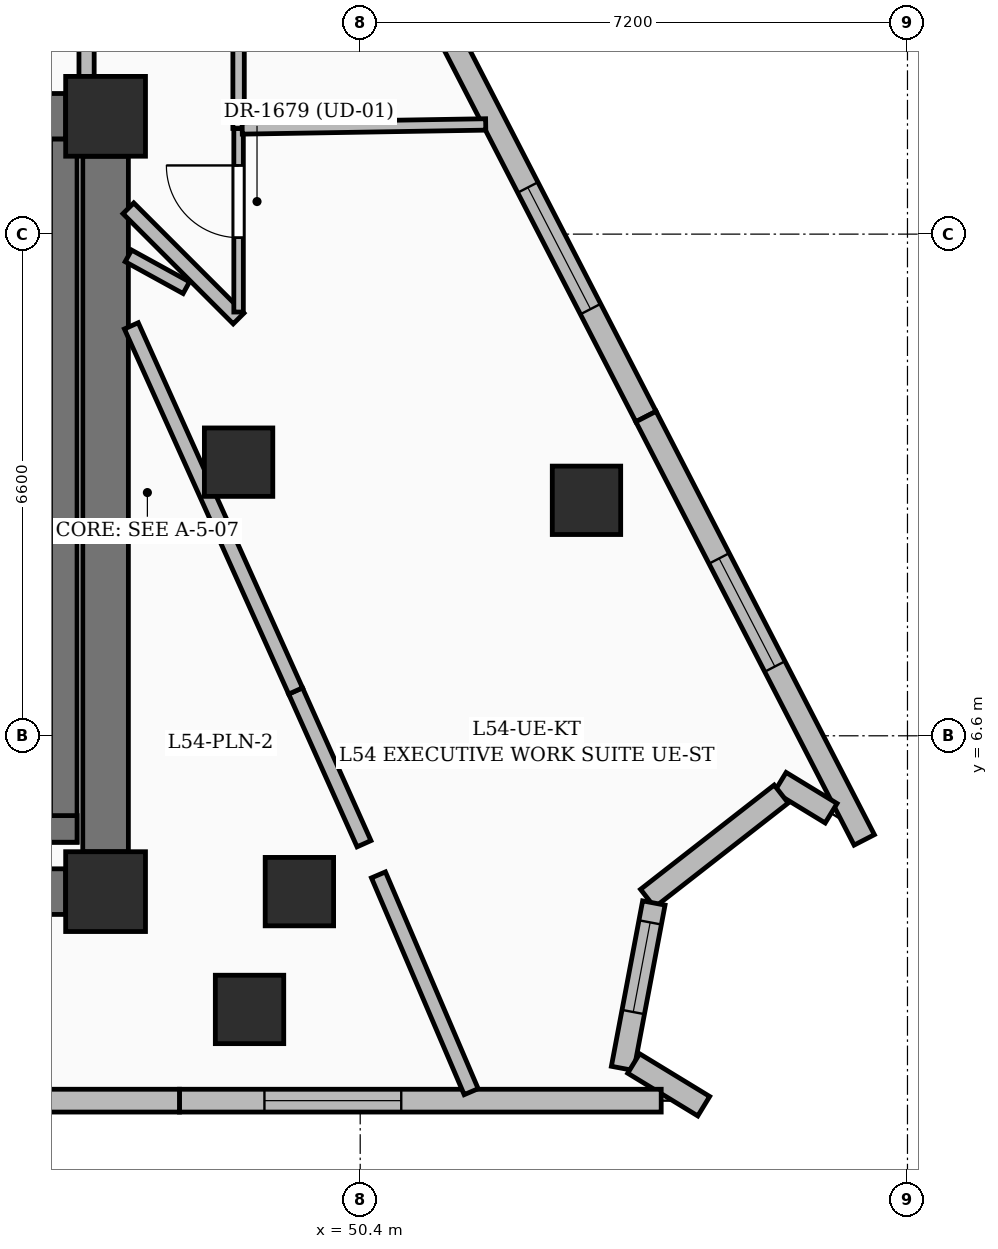
"""IFC4 building model, lengths in metres.
Left out: names, types, materials, properties, quantities, classifications, styles, units other than length and angle.
Written with IfcOpenShell. Run it as: python <this file> out.ifc"""

import sys

from ifc_helpers import new_model, si_unit, direction, frame, frame_2d, origin, origin_2d, place, context, subcontext, project, spatial, rectangle, extrude, element, fill, save


model = new_model("IFC4")
c1 = context("Model", 3, precision=1e-05, world=origin(), true_north=direction((0.0, 1.0)))
c2 = subcontext(c1, "Body", "Model", "MODEL_VIEW")
j1 = project(units=[si_unit("LENGTHUNIT", "METRE"), si_unit("PLANEANGLEUNIT", "RADIAN")], contexts=[c1])
p1 = place(None, origin())
s1 = spatial("IfcSite", under=j1, at=p1, CompositionType="ELEMENT")
p2 = place(p1, origin())
s2 = spatial("IfcBuilding", under=s1, at=p2, CompositionType="ELEMENT")
p3 = place(p2, frame((0.0, 0.0, 210.75)))
s3 = spatial("IfcBuildingStorey", under=s2, at=p3, CompositionType="ELEMENT", Elevation=210.75)
for number, where, z_axis, x_axis in (
    (1, (47.05, 4.55, 0.0), (0.0, 0.0, 1.0), (1.0, 0.0, 0.0)),
    (2, (47.05, 14.75, 0.0), (0.0, 0.0, 1.0), (1.0, 0.0, 0.0)),
):
    element("IfcColumn", number, at=place(p3, frame(where, z_axis=z_axis, x_axis=x_axis)), inside=s3, PredefinedType="COLUMN", context=c2, shape_type="SweptSolid", body=[
        extrude(rectangle(XDim=1.05, YDim=1.05, at=origin_2d()), origin(), (0.0, 0.0, 1.0), 3.75),
    ])
for number, where, z_axis, x_axis in (
    (3, (49.6, 4.55, 0.0), (0.0, 0.0, 1.0), (1.0, 0.0, 0.0)),
    (4, (48.8, 10.2, 0.0), (0.0, 0.0, 1.0), (1.0, 0.0, 0.0)),
):
    element("IfcColumn", number, at=place(p3, frame(where, z_axis=z_axis, x_axis=x_axis)), inside=s3, PredefinedType="COLUMN", context=c2, shape_type="SweptSolid", body=[
        extrude(rectangle(XDim=0.9, YDim=0.9, at=origin_2d()), origin(), (0.0, 0.0, 1.0), 3.75),
    ])
p4 = place(p3, frame((35.675, 4.55, 0.0), z_axis=(0.0, 0.0, 1.0), x_axis=(1.0, 0.0, 0.0)))
e5 = element("IfcWall", 5, at=p4, inside=s3, PredefinedType="SHEAR", context=c2, shape_type="SweptSolid", body=[
    extrude(rectangle(XDim=10.85, YDim=0.6, at=frame_2d((5.425, 0.0))), origin(), (0.0, 0.0, 1.0), 3.75),
])
p5 = place(p3, frame((35.675, 14.75, 0.0), z_axis=(0.0, 0.0, 1.0), x_axis=(1.0, 0.0, 0.0)))
e6 = element("IfcWall", 6, at=p5, inside=s3, PredefinedType="SHEAR", context=c2, shape_type="SweptSolid", body=[
    extrude(rectangle(XDim=10.85, YDim=0.6, at=frame_2d((5.425, 0.0))), origin(), (0.0, 0.0, 1.0), 3.75),
])
p6 = place(p5, frame((1.1, 0.0, 0.0)))
e7 = element("IfcOpeningElement", 7, at=p6, cuts=e6, PredefinedType="OPENING", context=c2, shape_type="SweptSolid", body=[
    extrude(rectangle(XDim=1.05, YDim=2.15, at=frame_2d((0.525, 1.075))), frame((0.0, 0.31, 0.0), z_axis=(0.0, -1.0, 0.0), x_axis=(1.0, 0.0, 0.0)), (0.0, 0.0, 1.0), 0.62),
])
p7 = place(p5, frame((8.7, 0.0, 0.0)))
e8 = element("IfcOpeningElement", 8, at=p7, cuts=e6, PredefinedType="OPENING", context=c2, shape_type="SweptSolid", body=[
    extrude(rectangle(XDim=1.05, YDim=2.15, at=frame_2d((0.525, 1.075))), frame((0.0, 0.31, 0.0), z_axis=(0.0, -1.0, 0.0), x_axis=(1.0, 0.0, 0.0)), (0.0, 0.0, 1.0), 0.62),
])
p8 = place(p5, frame((3.825, 0.0, 0.0)))
e9 = element("IfcOpeningElement", 9, at=p8, cuts=e6, PredefinedType="OPENING", context=c2, shape_type="SweptSolid", body=[
    extrude(rectangle(XDim=1.2, YDim=2.2, at=frame_2d((0.6, 1.1))), frame((0.0, 0.31, 0.0), z_axis=(0.0, -1.0, 0.0), x_axis=(1.0, 0.0, 0.0)), (0.0, 0.0, 1.0), 0.62),
])
p9 = place(p5, frame((5.825, 0.0, 0.0)))
e10 = element("IfcOpeningElement", 10, at=p9, cuts=e6, PredefinedType="OPENING", context=c2, shape_type="SweptSolid", body=[
    extrude(rectangle(XDim=1.2, YDim=2.2, at=frame_2d((0.6, 1.1))), frame((0.0, 0.31, 0.0), z_axis=(0.0, -1.0, 0.0), x_axis=(1.0, 0.0, 0.0)), (0.0, 0.0, 1.0), 0.62),
])
p10 = place(p3, frame((47.05, 5.075, 0.0), z_axis=(0.0, 0.0, 1.0), x_axis=(0.0, 1.0, 0.0)))
e11 = element("IfcWall", 11, at=p10, inside=s3, PredefinedType="SHEAR", context=c2, shape_type="SweptSolid", body=[
    extrude(rectangle(XDim=9.15, YDim=0.6, at=frame_2d((4.575, 0.0))), origin(), (0.0, 0.0, 1.0), 3.75),
])
p11 = place(p3, frame((46.5, 5.2, 0.0), z_axis=(0.0, 0.0, 1.0), x_axis=(0.0, 1.0, 0.0)))
e12 = element("IfcWall", 12, at=p11, inside=s3, PredefinedType="SOLIDWALL", context=c2, shape_type="SweptSolid", body=[
    extrude(rectangle(XDim=9.25, YDim=0.35, at=frame_2d((4.625, 0.0))), origin(), (0.0, 0.0, 1.0), 3.75),
])
p12 = place(p3, frame((43.125, 5.375, 0.0), z_axis=(0.0, 0.0, 1.0), x_axis=(1.0, 0.0, 0.0)))
e13 = element("IfcWall", 13, at=p12, inside=s3, PredefinedType="SOLIDWALL", context=c2, shape_type="SweptSolid", body=[
    extrude(rectangle(XDim=3.55, YDim=0.35, at=frame_2d((1.775, 0.0))), origin(), (0.0, 0.0, 1.0), 3.75),
])
for number, where, z_axis, x_axis in (
    (14, (48.944, 3.0, 0.0), (0.0, 0.0, 1.0), (1.0, 0.0, 0.0)),
    (15, (53.377, 9.698, 0.0), (0.0, 0.0, 1.0), (1.0, 0.0, 0.0)),
):
    element("IfcColumn", number, at=place(p3, frame(where, z_axis=z_axis, x_axis=x_axis)), inside=s3, PredefinedType="COLUMN", context=c2, shape_type="SweptSolid", body=[
        extrude(rectangle(XDim=0.9, YDim=0.9, at=origin_2d()), origin(), (0.0, 0.0, 1.0), 3.75),
    ])
p13 = place(p3, frame((51.288, 16.369, 0.0), z_axis=(0.0, 0.0, 1.0), x_axis=(0.458306446078, -0.88879424024, 0.0)))
e16 = element("IfcWall", 16, at=p13, inside=s3, PredefinedType="SOLIDWALL", context=c2, shape_type="SweptSolid", body=[
    extrude(rectangle(XDim=6.266, YDim=0.3, at=frame_2d((3.133, 0.0))), origin(), (0.0, 0.0, 1.0), 3.5),
])
p14 = place(p13, frame((2.875, 0.0, 0.6)))
e17 = element("IfcOpeningElement", 17, at=p14, cuts=e16, PredefinedType="OPENING", context=c2, shape_type="SweptSolid", body=[
    extrude(rectangle(XDim=1.8, YDim=2.1, at=frame_2d((0.9, 1.05))), frame((0.0, 0.16, 0.0), z_axis=(0.0, -1.0, 0.0), x_axis=(1.0, 0.0, 0.0)), (0.0, 0.0, 1.0), 0.32),
])
p15 = place(p3, frame((54.159, 10.8, 0.0), z_axis=(0.0, 0.0, 1.0), x_axis=(0.458322317218, -0.888786056113, 0.0)))
e18 = element("IfcWall", 18, at=p15, inside=s3, PredefinedType="SOLIDWALL", context=c2, shape_type="SweptSolid", body=[
    extrude(rectangle(XDim=6.266, YDim=0.3, at=frame_2d((3.133, 0.0))), origin(), (0.0, 0.0, 1.0), 3.5),
])
p16 = place(p15, frame((2.1, 0.0, 0.55)))
e19 = element("IfcOpeningElement", 19, at=p16, cuts=e18, PredefinedType="OPENING", context=c2, shape_type="SweptSolid", body=[
    extrude(rectangle(XDim=1.6, YDim=2.2, at=frame_2d((0.8, 1.1))), frame((0.0, 0.16, 0.0), z_axis=(0.0, -1.0, 0.0), x_axis=(1.0, 0.0, 0.0)), (0.0, 0.0, 1.0), 0.32),
])
p17 = place(p3, frame((56.595, 5.581, 0.0), z_axis=(0.0, 0.0, 1.0), x_axis=(-0.853681479387, 0.520795479772, 0.0)))
e20 = element("IfcWall", 20, at=p17, inside=s3, PredefinedType="SOLIDWALL", context=c2, shape_type="SweptSolid", body=[
    extrude(rectangle(XDim=0.785, YDim=0.3, at=frame_2d((0.392, 0.0))), origin(), (0.0, 0.0, 1.0), 3.5),
])
p18 = place(p3, frame((55.939, 5.834, 0.0), z_axis=(0.0, 0.0, 1.0), x_axis=(-0.788331324268, -0.615250943256, 0.0)))
e21 = element("IfcWall", 21, at=p18, inside=s3, PredefinedType="SOLIDWALL", context=c2, shape_type="SweptSolid", body=[
    extrude(rectangle(XDim=2.23, YDim=0.3, at=frame_2d((1.115, 0.0))), origin(), (0.0, 0.0, 1.0), 3.5),
])
p19 = place(p3, frame((54.263, 4.401, 0.0), z_axis=(0.0, 0.0, 1.0), x_axis=(-0.185632792315, -0.982619186876, 0.0)))
e22 = element("IfcWall", 22, at=p19, inside=s3, PredefinedType="SOLIDWALL", context=c2, shape_type="SweptSolid", body=[
    extrude(rectangle(XDim=2.215, YDim=0.3, at=frame_2d((1.107, 0.0))), origin(), (0.0, 0.0, 1.0), 3.5),
])
p20 = place(p19, frame((0.26, 0.0, 0.8)))
e23 = element("IfcOpeningElement", 23, at=p20, cuts=e22, PredefinedType="OPENING", context=c2, shape_type="SweptSolid", body=[
    extrude(rectangle(XDim=1.2, YDim=1.8, at=frame_2d((0.6, 0.9))), frame((0.0, 0.16, 0.0), z_axis=(0.0, -1.0, 0.0), x_axis=(1.0, 0.0, 0.0)), (0.0, 0.0, 1.0), 0.32),
])
p21 = place(p3, frame((53.998, 2.289, 0.0), z_axis=(0.0, 0.0, 1.0), x_axis=(0.853840299064, -0.520535055203, 0.0)))
e24 = element("IfcWall", 24, at=p21, inside=s3, PredefinedType="SOLIDWALL", context=c2, shape_type="SweptSolid", body=[
    extrude(rectangle(XDim=1.08, YDim=0.3, at=frame_2d((0.54, 0.0))), origin(), (0.0, 0.0, 1.0), 3.5),
])
p22 = place(p3, frame((54.36, 1.8, 0.0), z_axis=(0.0, 0.0, 1.0), x_axis=(-1.0, 0.0, 0.0)))
e25 = element("IfcWall", 25, at=p22, inside=s3, PredefinedType="SOLIDWALL", context=c2, shape_type="SweptSolid", body=[
    extrude(rectangle(XDim=6.338, YDim=0.3, at=frame_2d((3.169, 0.0))), origin(), (0.0, 0.0, 1.0), 3.5),
])
p23 = place(p22, frame((3.42, 0.0, 0.6)))
e26 = element("IfcOpeningElement", 26, at=p23, cuts=e25, PredefinedType="OPENING", context=c2, shape_type="SweptSolid", body=[
    extrude(rectangle(XDim=1.8, YDim=2.1, at=frame_2d((0.9, 1.05))), frame((0.0, 0.16, 0.0), z_axis=(0.0, -1.0, 0.0), x_axis=(1.0, 0.0, 0.0)), (0.0, 0.0, 1.0), 0.32),
])
p24 = place(p3, frame((48.022, 1.8, 0.0), z_axis=(0.0, 0.0, 1.0), x_axis=(-1.0, 0.0, 0.0)))
e27 = element("IfcWall", 27, at=p24, inside=s3, PredefinedType="SOLIDWALL", context=c2, shape_type="SweptSolid", body=[
    extrude(rectangle(XDim=6.918, YDim=0.3, at=frame_2d((3.459, 0.0))), origin(), (0.0, 0.0, 1.0), 3.5),
])
p25 = place(p24, frame((2.975, 0.0, 0.55)))
e28 = element("IfcOpeningElement", 28, at=p25, cuts=e27, PredefinedType="OPENING", context=c2, shape_type="SweptSolid", body=[
    extrude(rectangle(XDim=1.6, YDim=2.2, at=frame_2d((0.8, 1.1))), frame((0.0, 0.16, 0.0), z_axis=(0.0, -1.0, 0.0), x_axis=(1.0, 0.0, 0.0)), (0.0, 0.0, 1.0), 0.32),
])
p26 = place(p3, frame((46.8, 15.05, 0.0), z_axis=(0.0, 0.0, 1.0), x_axis=(0.0, 1.0, 0.0)))
e29 = element("IfcWall", 29, at=p26, inside=s3, PredefinedType="PARTITIONING", context=c2, shape_type="SweptSolid", body=[
    extrude(rectangle(XDim=1.7, YDim=0.2, at=frame_2d((0.85, 0.0))), origin(), (0.0, 0.0, 1.0), 2.685),
])
p27 = place(p3, frame((50.45, 5.18, 0.0), z_axis=(0.0, 0.0, 1.0), x_axis=(-0.408626143047, 0.912701854506, 0.0)))
e30 = element("IfcWall", 30, at=p27, inside=s3, PredefinedType="PARTITIONING", context=c2, shape_type="SweptSolid", body=[
    extrude(rectangle(XDim=2.202, YDim=0.2, at=frame_2d((1.101, 0.0))), origin(), (0.0, 0.0, 1.0), 2.82),
])
p28 = place(p3, frame((51.86, 1.918, 0.0), z_axis=(0.0, 0.0, 1.0), x_axis=(-0.393349316575, 0.919389098886, 0.0)))
e31 = element("IfcWall", 31, at=p28, inside=s3, PredefinedType="PARTITIONING", context=c2, shape_type="SweptSolid", body=[
    extrude(rectangle(XDim=3.102, YDim=0.2, at=frame_2d((1.551, 0.0))), origin(), (0.0, 0.0, 1.0), 3.5),
])
p29 = place(p3, frame((49.55, 7.19, 0.0), z_axis=(0.0, 0.0, 1.0), x_axis=(-0.410297221829, 0.91195185715, 0.0)))
e32 = element("IfcWall", 32, at=p29, inside=s3, PredefinedType="PARTITIONING", context=c2, shape_type="SweptSolid", body=[
    extrude(rectangle(XDim=5.267, YDim=0.2, at=frame_2d((2.634, 0.0))), origin(), (0.0, 0.0, 1.0), 2.685),
])
p30 = place(p3, frame((48.8, 12.09, 0.0), z_axis=(0.0, 0.0, 1.0), x_axis=(-0.707106781187, 0.707106781187, 0.0)))
e33 = element("IfcWall", 33, at=p30, inside=s3, PredefinedType="PARTITIONING", context=c2, shape_type="SweptSolid", body=[
    extrude(rectangle(XDim=2.051, YDim=0.2, at=frame_2d((1.025, 0.0))), origin(), (0.0, 0.0, 1.0), 3.5),
])
p31 = place(p3, frame((48.8, 12.175, 0.0), z_axis=(0.0, 0.0, 1.0), x_axis=(0.0, 1.0, 0.0)))
e34 = element("IfcWall", 34, at=p31, inside=s3, PredefinedType="PARTITIONING", context=c2, shape_type="SweptSolid", body=[
    extrude(rectangle(XDim=2.415, YDim=0.125, at=frame_2d((1.208, 0.0))), origin(), (0.0, 0.0, 1.0), 3.16),
])
p32 = place(p31, frame((0.979, 0.0, 0.0)))
e35 = element("IfcOpeningElement", 35, at=p32, cuts=e34, PredefinedType="OPENING", context=c2, shape_type="SweptSolid", body=[
    extrude(rectangle(XDim=0.95, YDim=2.2, at=frame_2d((0.475, 1.1))), frame((0.0, 0.072, 0.0), z_axis=(0.0, -1.0, 0.0), x_axis=(1.0, 0.0, 0.0)), (0.0, 0.0, 1.0), 0.145),
])
p33 = place(p3, frame((48.8, 14.59, 0.0), z_axis=(0.0, 0.0, 1.0), x_axis=(0.0, 1.0, 0.0)))
e36 = element("IfcWall", 36, at=p33, inside=s3, PredefinedType="PARTITIONING", context=c2, shape_type="SweptSolid", body=[
    extrude(rectangle(XDim=2.57, YDim=0.15, at=frame_2d((1.285, 0.0))), origin(), (0.0, 0.0, 1.0), 2.685),
])
p34 = place(p3, frame((52.051, 14.643, 0.0), z_axis=(0.0, 0.0, 1.0), x_axis=(-0.999865797865, -0.016382498593, 0.0)))
e37 = element("IfcWall", 37, at=p34, inside=s3, PredefinedType="PARTITIONING", context=c2, shape_type="SweptSolid", body=[
    extrude(rectangle(XDim=3.204, YDim=0.15, at=frame_2d((1.602, 0.0))), origin(), (0.0, 0.0, 1.0), 2.82),
])
p35 = place(p3, frame((47.35, 12.914, 0.0), z_axis=(0.0, 0.0, 1.0), x_axis=(0.876281108122, -0.481800186331, 0.0)))
e38 = element("IfcWall", 38, at=p35, inside=s3, PredefinedType="PARTITIONING", context=c2, shape_type="SweptSolid", body=[
    extrude(rectangle(XDim=0.87, YDim=0.175, at=frame_2d((0.435, 0.0))), origin(), (0.0, 0.0, 1.0), 3.5),
])
p36 = place(p14, origin())
e39 = element("IfcWindow", 39, at=p36, inside=s3, PartitioningType="SINGLE_PANEL", PredefinedType="WINDOW", context=c2, shape_type="SweptSolid", body=[
    extrude(rectangle(XDim=1.8, YDim=2.1, at=frame_2d((0.9, 1.05))), frame((0.0, 0.03, 0.0), z_axis=(0.0, -1.0, 0.0), x_axis=(1.0, 0.0, 0.0)), (0.0, 0.0, 1.0), 0.06),
])
fill(e17, e39)
p37 = place(p16, origin())
e40 = element("IfcWindow", 40, at=p37, inside=s3, PartitioningType="SINGLE_PANEL", PredefinedType="WINDOW", context=c2, shape_type="SweptSolid", body=[
    extrude(rectangle(XDim=1.6, YDim=2.2, at=frame_2d((0.8, 1.1))), frame((0.0, 0.03, 0.0), z_axis=(0.0, -1.0, 0.0), x_axis=(1.0, 0.0, 0.0)), (0.0, 0.0, 1.0), 0.06),
])
fill(e19, e40)
p38 = place(p20, origin())
e41 = element("IfcWindow", 41, at=p38, inside=s3, PartitioningType="SINGLE_PANEL", PredefinedType="WINDOW", context=c2, shape_type="SweptSolid", body=[
    extrude(rectangle(XDim=1.2, YDim=1.8, at=frame_2d((0.6, 0.9))), frame((0.0, 0.03, 0.0), z_axis=(0.0, -1.0, 0.0), x_axis=(1.0, 0.0, 0.0)), (0.0, 0.0, 1.0), 0.06),
])
fill(e23, e41)
p39 = place(p23, origin())
e42 = element("IfcWindow", 42, at=p39, inside=s3, PartitioningType="SINGLE_PANEL", PredefinedType="WINDOW", context=c2, shape_type="SweptSolid", body=[
    extrude(rectangle(XDim=1.8, YDim=2.1, at=frame_2d((0.9, 1.05))), frame((0.0, 0.03, 0.0), z_axis=(0.0, -1.0, 0.0), x_axis=(1.0, 0.0, 0.0)), (0.0, 0.0, 1.0), 0.06),
])
fill(e26, e42)
p40 = place(p32, origin())
e43 = element("IfcDoor", 43, at=p40, inside=s3, OperationType="SINGLE_SWING_RIGHT", PredefinedType="DOOR", context=c2, shape_type="SweptSolid", body=[
    extrude(rectangle(XDim=0.95, YDim=2.2, at=frame_2d((0.475, 1.1))), frame((0.0, 0.025, 0.0), z_axis=(0.0, -1.0, 0.0), x_axis=(1.0, 0.0, 0.0)), (0.0, 0.0, 1.0), 0.05),
])
fill(e35, e43)
save(model, sys.argv[1])
